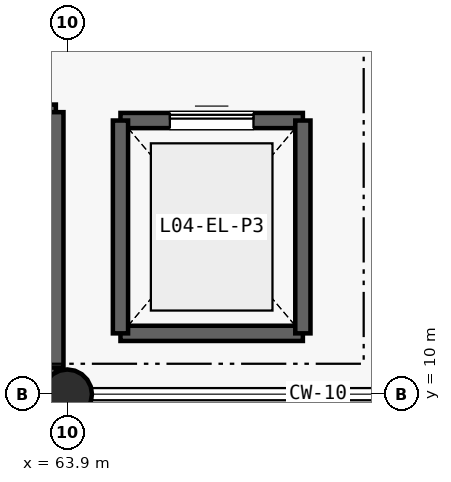
"""IFC4 building model, lengths in metres.
Left out: names, types, materials, properties, quantities, classifications, styles, units other than length and angle.
Written with IfcOpenShell. Run it as: python <this file> out.ifc"""

import sys

from ifc_helpers import new_model, si_unit, direction, frame, frame_2d, origin, origin_2d, place, context, subcontext, project, spatial, rectangle, circle, extrude, element, fill, save


model = new_model("IFC4")
c1 = context("Model", 3, precision=1e-05, world=origin(), true_north=direction((0.0, 1.0)))
c2 = subcontext(c1, "Body", "Model", "MODEL_VIEW")
j1 = project(units=[si_unit("LENGTHUNIT", "METRE"), si_unit("PLANEANGLEUNIT", "RADIAN")], contexts=[c1])
p1 = place(None, origin())
s1 = spatial("IfcSite", under=j1, at=p1, CompositionType="ELEMENT")
p2 = place(p1, origin())
s2 = spatial("IfcBuilding", under=s1, at=p2, CompositionType="ELEMENT")
p3 = place(p2, frame((0.0, 0.0, 16.8)))
s3 = spatial("IfcBuildingStorey", under=s2, at=p3, CompositionType="ELEMENT", Elevation=16.8)
p4 = place(p3, frame((63.9, 10.0, 0.0), z_axis=(0.0, 0.0, 1.0), x_axis=(1.0, 0.0, 0.0)))
e1 = element("IfcColumn", 1, at=p4, inside=s3, PredefinedType="COLUMN", context=c2, shape_type="SweptSolid", body=[
    extrude(circle(Radius=0.325, at=origin_2d()), origin(), (0.0, 0.0, 1.0), 4.2),
])
p5 = place(p3, frame((57.45, 10.35, 0.0), z_axis=(0.0, 0.0, 1.0), x_axis=(1.0, 0.0, 0.0)))
e2 = element("IfcWall", 2, at=p5, inside=s3, PredefinedType="SHEAR", context=c2, shape_type="SweptSolid", body=[
    extrude(rectangle(XDim=6.3, YDim=0.2, at=frame_2d((3.15, 0.0))), origin(), (0.0, 0.0, 1.0), 4.2),
])
p6 = place(p3, frame((57.45, 13.71, 0.0), z_axis=(0.0, 0.0, 1.0), x_axis=(1.0, 0.0, 0.0)))
e3 = element("IfcWall", 3, at=p6, inside=s3, PredefinedType="SHEAR", context=c2, shape_type="SweptSolid", body=[
    extrude(rectangle(XDim=6.3, YDim=0.2, at=frame_2d((3.15, 0.0))), origin(), (0.0, 0.0, 1.0), 4.2),
])
p7 = place(p6, frame((0.32, 0.0, 0.0)))
e4 = element("IfcOpeningElement", 4, at=p7, cuts=e3, PredefinedType="OPENING", context=c2, shape_type="SweptSolid", body=[
    extrude(rectangle(XDim=1.2, YDim=2.15, at=frame_2d((0.6, 1.075))), frame((0.0, 0.11, 0.0), z_axis=(0.0, -1.0, 0.0), x_axis=(1.0, 0.0, 0.0)), (0.0, 0.0, 1.0), 0.22),
])
p8 = place(p3, frame((63.75, 10.35, 0.0), z_axis=(0.0, 0.0, 1.0), x_axis=(0.0, 1.0, 0.0)))
e5 = element("IfcWall", 5, at=p8, inside=s3, PredefinedType="SHEAR", context=c2, shape_type="SweptSolid", body=[
    extrude(rectangle(XDim=3.36, YDim=0.2, at=frame_2d((1.68, 0.0))), origin(), (0.0, 0.0, 1.0), 4.2),
])
p9 = place(p3, frame((64.6, 10.8, 0.0), z_axis=(0.0, 0.0, 1.0), x_axis=(1.0, 0.0, 0.0)))
e6 = element("IfcWall", 6, at=p9, inside=s3, PredefinedType="SHEAR", context=c2, shape_type="SweptSolid", body=[
    extrude(rectangle(XDim=2.4, YDim=0.2, at=frame_2d((1.2, 0.0))), origin(), (0.0, 0.0, 1.0), 4.2),
])
p10 = place(p3, frame((64.6, 13.6, 0.0), z_axis=(0.0, 0.0, 1.0), x_axis=(1.0, 0.0, 0.0)))
e7 = element("IfcWall", 7, at=p10, inside=s3, PredefinedType="SHEAR", context=c2, shape_type="SweptSolid", body=[
    extrude(rectangle(XDim=2.4, YDim=0.2, at=frame_2d((1.2, 0.0))), origin(), (0.0, 0.0, 1.0), 4.2),
])
p11 = place(p10, frame((0.65, 0.0, 0.0)))
e8 = element("IfcOpeningElement", 8, at=p11, cuts=e7, PredefinedType="OPENING", context=c2, shape_type="SweptSolid", body=[
    extrude(rectangle(XDim=1.1, YDim=2.15, at=frame_2d((0.55, 1.075))), frame((0.0, 0.11, 0.0), z_axis=(0.0, -1.0, 0.0), x_axis=(1.0, 0.0, 0.0)), (0.0, 0.0, 1.0), 0.22),
])
for number, where, z_axis, x_axis in (
    (9, (64.6, 10.8, 0.0), (0.0, 0.0, 1.0), (0.0, 1.0, 0.0)),
    (10, (67.0, 10.8, 0.0), (0.0, 0.0, 1.0), (0.0, 1.0, 0.0)),
):
    element("IfcWall", number, at=place(p3, frame(where, z_axis=z_axis, x_axis=x_axis)), inside=s3, PredefinedType="SHEAR", context=c2, shape_type="SweptSolid", body=[
        extrude(rectangle(XDim=2.8, YDim=0.2, at=frame_2d((1.4, 0.0))), origin(), (0.0, 0.0, 1.0), 4.2),
    ])
p12 = place(p11, origin())
e11 = element("IfcDoor", 11, at=p12, inside=s3, OperationType="SLIDING_TO_LEFT", PredefinedType="DOOR", context=c2, shape_type="SweptSolid", body=[
    extrude(rectangle(XDim=1.1, YDim=2.15, at=frame_2d((0.55, 1.075))), frame((0.0, 0.025, 0.0), z_axis=(0.0, -1.0, 0.0), x_axis=(1.0, 0.0, 0.0)), (0.0, 0.0, 1.0), 0.05),
])
fill(e8, e11)
save(model, sys.argv[1])
